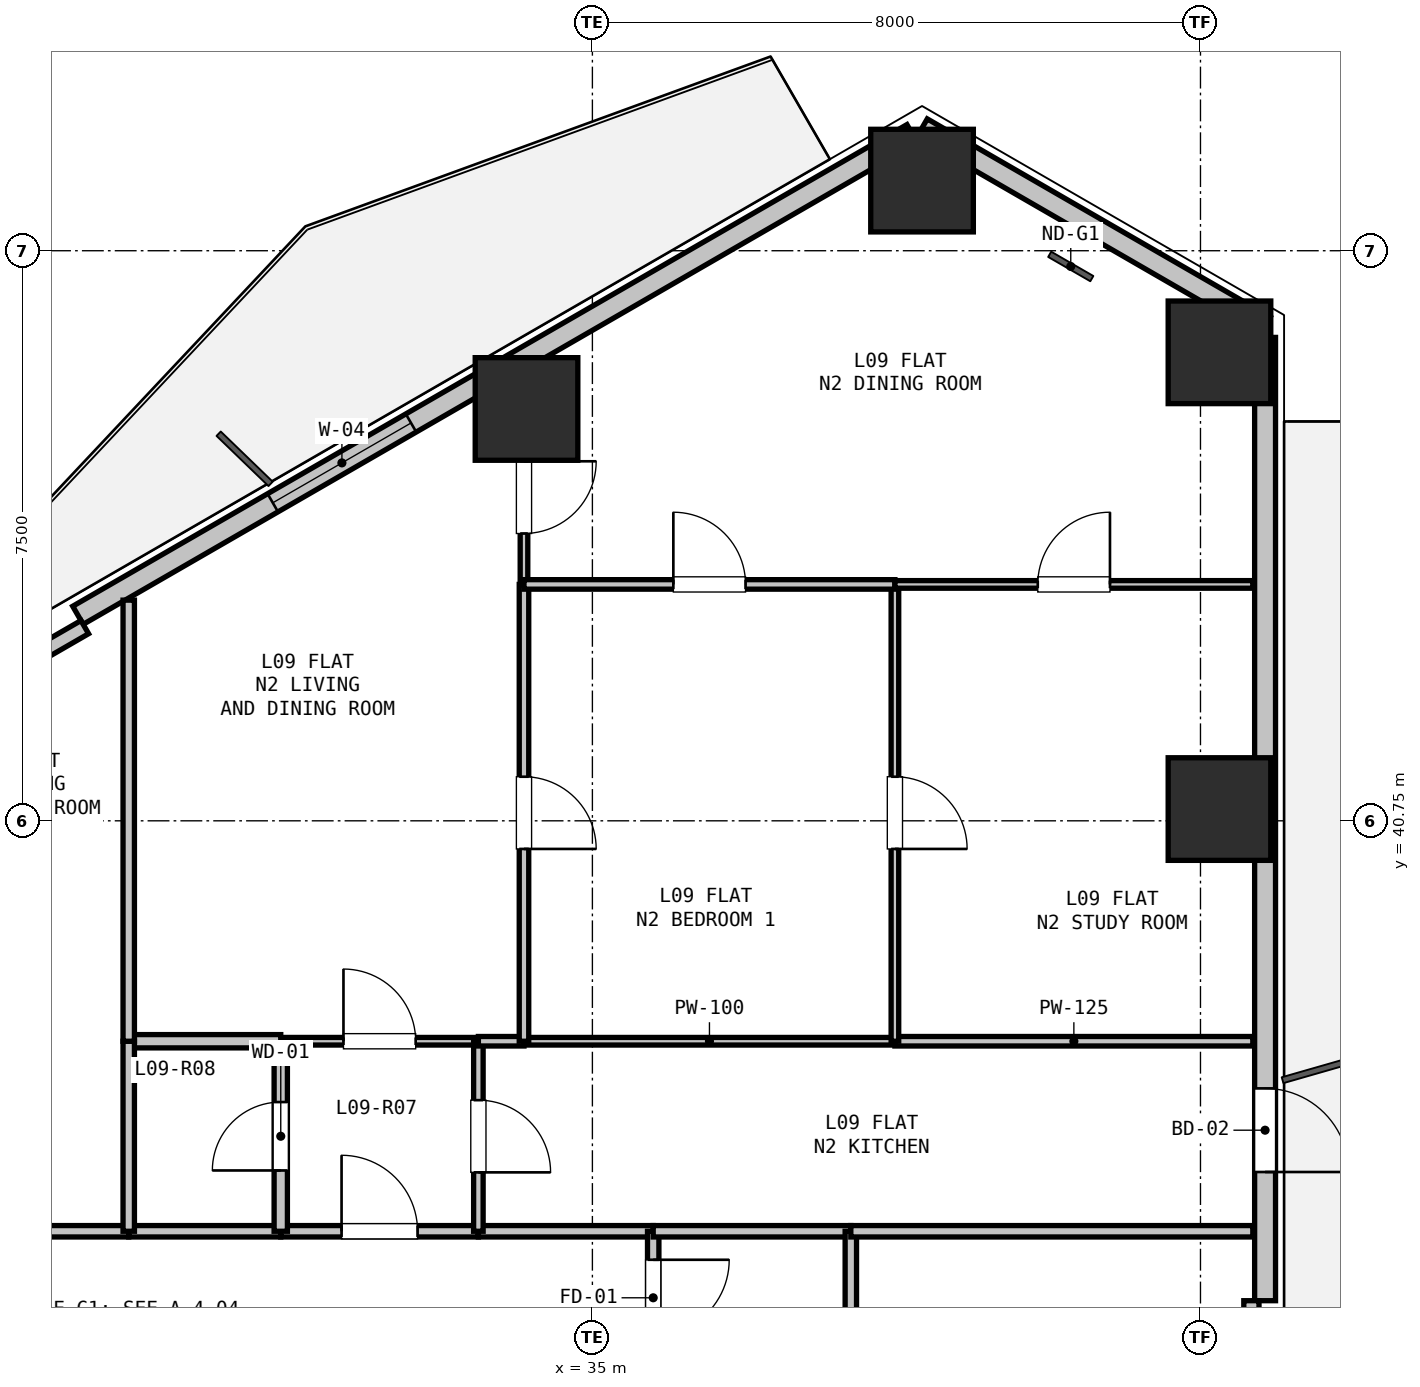
"""IFC4 building model, lengths in metres.
Left out: names, types, materials, properties, quantities, classifications, styles, units other than length and angle.
Written with IfcOpenShell. Run it as: python <this file> out.ifc"""

import sys

from ifc_helpers import new_model, si_unit, direction, frame, frame_2d, origin, origin_2d, place, context, subcontext, project, spatial, rectangle, hollow_rectangle, extrude, element, fill, save


model = new_model("IFC4")
c1 = context("Model", 3, precision=1e-05, world=origin(), true_north=direction((0.0, 1.0)))
c2 = subcontext(c1, "Body", "Model", "MODEL_VIEW")
j1 = project(units=[si_unit("LENGTHUNIT", "METRE"), si_unit("PLANEANGLEUNIT", "RADIAN")], contexts=[c1])
p1 = place(None, origin())
s1 = spatial("IfcSite", under=j1, at=p1, CompositionType="ELEMENT")
p2 = place(p1, origin())
s2 = spatial("IfcBuilding", under=s1, at=p2, CompositionType="ELEMENT")
p3 = place(p2, frame((0.0, 0.0, 35.7)))
s3 = spatial("IfcBuildingStorey", under=s2, at=p3, CompositionType="ELEMENT", Elevation=35.7)
for number, where, z_axis, x_axis in (
    (1, (34.133, 46.168, 0.0), (0.0, 0.0, 1.0), (1.0, 0.0, 0.0)),
    (2, (39.337, 49.173, 0.0), (0.0, 0.0, 1.0), (1.0, 0.0, 0.0)),
    (3, (43.25, 46.913, 0.0), (0.0, 0.0, 1.0), (1.0, 0.0, 0.0)),
    (4, (43.25, 40.905, 0.0), (0.0, 0.0, 1.0), (1.0, 0.0, 0.0)),
):
    element("IfcColumn", number, at=place(p3, frame(where, z_axis=z_axis, x_axis=x_axis)), inside=s3, PredefinedType="COLUMN", context=c2, shape_type="SweptSolid", body=[
        extrude(hollow_rectangle(XDim=1.35, YDim=1.35, WallThickness=0.036, at=origin_2d()), origin(), (0.0, 0.0, 1.0), 3.3),
    ])
p4 = place(p3, frame((39.337, 49.865, 0.0), z_axis=(0.0, 0.0, 1.0), x_axis=(0.866043601342, -0.499968479581, 0.0)))
e5 = element("IfcWall", 5, at=p4, inside=s3, PredefinedType="SOLIDWALL", context=c2, shape_type="SweptSolid", body=[
    extrude(rectangle(XDim=5.211, YDim=0.275, at=frame_2d((2.605, 0.0))), origin(), (0.0, 0.0, 1.0), 2.66),
])
p5 = place(p3, frame((28.232, 43.454, 0.0), z_axis=(0.0, 0.0, 1.0), x_axis=(0.86603192154, 0.499988710747, 0.0)))
e6 = element("IfcWall", 6, at=p5, inside=s3, PredefinedType="SOLIDWALL", context=c2, shape_type="SweptSolid", body=[
    extrude(rectangle(XDim=12.673, YDim=0.275, at=frame_2d((6.336, 0.0))), origin(), (0.0, 0.0, 1.0), 2.66),
])
p6 = place(p5, frame((2.96, 0.0, 0.9)))
e7 = element("IfcOpeningElement", 7, at=p6, cuts=e6, PredefinedType="OPENING", context=c2, shape_type="SweptSolid", body=[
    extrude(rectangle(XDim=2.1, YDim=1.6, at=frame_2d((1.05, 0.8))), frame((0.0, 0.147, 0.0), z_axis=(0.0, -1.0, 0.0), x_axis=(1.0, 0.0, 0.0)), (0.0, 0.0, 1.0), 0.295),
])
p7 = place(p3, frame((26.85, 42.448, 0.0), z_axis=(0.0, 0.0, 1.0), x_axis=(0.86605165483, 0.499954529098, 0.0)))
e8 = element("IfcWall", 8, at=p7, inside=s3, PredefinedType="PARAPET", context=c2, shape_type="SweptSolid", body=[
    extrude(rectangle(XDim=1.7, YDim=0.2, at=frame_2d((0.85, 0.0))), origin(), (0.0, 0.0, 1.0), 2.66),
])
p8 = place(p3, frame((43.85, 47.11, 0.0), z_axis=(0.0, 0.0, 1.0), x_axis=(0.0, -1.0, 0.0)))
e9 = element("IfcWall", 9, at=p8, inside=s3, PredefinedType="SOLIDWALL", context=c2, shape_type="SweptSolid", body=[
    extrude(rectangle(XDim=12.673, YDim=0.275, at=frame_2d((6.336, 0.0))), origin(), (0.0, 0.0, 1.0), 2.66),
])
p9 = place(p8, frame((9.88, 0.0, 0.0)))
e10 = element("IfcOpeningElement", 10, at=p9, cuts=e9, PredefinedType="OPENING", context=c2, shape_type="SweptSolid", body=[
    extrude(rectangle(XDim=1.1, YDim=2.1, at=frame_2d((0.55, 1.05))), frame((0.0, 0.147, 0.0), z_axis=(0.0, -1.0, 0.0), x_axis=(1.0, 0.0, 0.0)), (0.0, 0.0, 1.0), 0.295),
])
p10 = place(p3, frame((43.67, 34.437, 0.0), z_axis=(0.0, 0.0, 1.0), x_axis=(0.0, -1.0, 0.0)))
e11 = element("IfcWall", 11, at=p10, inside=s3, PredefinedType="PARAPET", context=c2, shape_type="SweptSolid", body=[
    extrude(rectangle(XDim=1.7, YDim=0.2, at=frame_2d((0.85, 0.0))), origin(), (0.0, 0.0, 1.0), 2.66),
])
p11 = place(p3, frame((27.3, 35.35, 0.0), z_axis=(0.0, 0.0, 1.0), x_axis=(1.0, 0.0, 0.0)))
e12 = element("IfcWall", 12, at=p11, inside=s3, PredefinedType="PARTITIONING", context=c2, shape_type="SweptSolid", body=[
    extrude(rectangle(XDim=1.6, YDim=0.15, at=frame_2d((0.8, 0.0))), origin(), (0.0, 0.0, 1.0), 3.04),
])
p12 = place(p3, frame((28.9, 35.35, 0.0), z_axis=(0.0, 0.0, 1.0), x_axis=(1.0, 0.0, 0.0)))
e13 = element("IfcWall", 13, at=p12, inside=s3, PredefinedType="PARTITIONING", context=c2, shape_type="SweptSolid", body=[
    extrude(rectangle(XDim=2.0, YDim=0.15, at=frame_2d((1.0, 0.0))), origin(), (0.0, 0.0, 1.0), 3.04),
])
p13 = place(p3, frame((30.9, 35.35, 0.0), z_axis=(0.0, 0.0, 1.0), x_axis=(1.0, 0.0, 0.0)))
e14 = element("IfcWall", 14, at=p13, inside=s3, PredefinedType="PARTITIONING", context=c2, shape_type="SweptSolid", body=[
    extrude(rectangle(XDim=2.6, YDim=0.15, at=frame_2d((1.3, 0.0))), origin(), (0.0, 0.0, 1.0), 3.04),
])
p14 = place(p13, frame((0.8, 0.0, 0.0)))
e15 = element("IfcOpeningElement", 15, at=p14, cuts=e14, PredefinedType="OPENING", context=c2, shape_type="SweptSolid", body=[
    extrude(rectangle(XDim=1.0, YDim=2.15, at=frame_2d((0.5, 1.075))), frame((0.0, 0.085, 0.0), z_axis=(0.0, -1.0, 0.0), x_axis=(1.0, 0.0, 0.0)), (0.0, 0.0, 1.0), 0.17),
])
p15 = place(p3, frame((33.5, 35.35, 0.0), z_axis=(0.0, 0.0, 1.0), x_axis=(1.0, 0.0, 0.0)))
e16 = element("IfcWall", 16, at=p15, inside=s3, PredefinedType="PARTITIONING", context=c2, shape_type="SweptSolid", body=[
    extrude(rectangle(XDim=2.3, YDim=0.15, at=frame_2d((1.15, 0.0))), origin(), (0.0, 0.0, 1.0), 3.04),
])
p16 = place(p3, frame((35.8, 35.35, 0.0), z_axis=(0.0, 0.0, 1.0), x_axis=(0.0, -1.0, 0.0)))
e17 = element("IfcWall", 17, at=p16, inside=s3, PredefinedType="PARTITIONING", context=c2, shape_type="SweptSolid", body=[
    extrude(rectangle(XDim=1.75, YDim=0.15, at=frame_2d((0.875, 0.0))), origin(), (0.0, 0.0, 1.0), 3.04),
])
p17 = place(p16, frame((0.375, 0.0, 0.0)))
e18 = element("IfcOpeningElement", 18, at=p17, cuts=e17, PredefinedType="OPENING", context=c2, shape_type="SweptSolid", body=[
    extrude(rectangle(XDim=1.0, YDim=2.15, at=frame_2d((0.5, 1.075))), frame((0.0, 0.085, 0.0), z_axis=(0.0, -1.0, 0.0), x_axis=(1.0, 0.0, 0.0)), (0.0, 0.0, 1.0), 0.17),
])
p18 = place(p3, frame((35.8, 35.35, 0.0), z_axis=(0.0, 0.0, 1.0), x_axis=(1.0, 0.0, 0.0)))
e19 = element("IfcWall", 19, at=p18, inside=s3, PredefinedType="PARTITIONING", context=c2, shape_type="SweptSolid", body=[
    extrude(rectangle(XDim=2.6, YDim=0.15, at=frame_2d((1.3, 0.0))), origin(), (0.0, 0.0, 1.0), 2.338),
])
p19 = place(p3, frame((38.4, 35.35, 0.0), z_axis=(0.0, 0.0, 1.0), x_axis=(0.0, -1.0, 0.0)))
e20 = element("IfcWall", 20, at=p19, inside=s3, PredefinedType="PARTITIONING", context=c2, shape_type="SweptSolid", body=[
    extrude(rectangle(XDim=5.35, YDim=0.15, at=frame_2d((2.675, 0.0))), origin(), (0.0, 0.0, 1.0), 2.338),
])
p20 = place(p3, frame((30.9, 37.85, 0.0), z_axis=(0.0, 0.0, 1.0), x_axis=(1.0, 0.0, 0.0)))
e21 = element("IfcWall", 21, at=p20, inside=s3, PredefinedType="PARTITIONING", context=c2, shape_type="SweptSolid", body=[
    extrude(rectangle(XDim=2.6, YDim=0.1, at=frame_2d((1.3, 0.0))), origin(), (0.0, 0.0, 1.0), 3.04),
])
p21 = place(p20, frame((0.825, 0.0, 0.0)))
e22 = element("IfcOpeningElement", 22, at=p21, cuts=e21, PredefinedType="OPENING", context=c2, shape_type="SweptSolid", body=[
    extrude(rectangle(XDim=0.95, YDim=2.1, at=frame_2d((0.475, 1.05))), frame((0.0, 0.06, 0.0), z_axis=(0.0, -1.0, 0.0), x_axis=(1.0, 0.0, 0.0)), (0.0, 0.0, 1.0), 0.12),
])
p22 = place(p3, frame((33.5, 37.85, 0.0), z_axis=(0.0, 0.0, 1.0), x_axis=(0.0, -1.0, 0.0)))
e23 = element("IfcWall", 23, at=p22, inside=s3, PredefinedType="PARTITIONING", context=c2, shape_type="SweptSolid", body=[
    extrude(rectangle(XDim=2.5, YDim=0.125, at=frame_2d((1.25, 0.0))), origin(), (0.0, 0.0, 1.0), 3.04),
])
p23 = place(p22, frame((0.775, 0.0, 0.0)))
e24 = element("IfcOpeningElement", 24, at=p23, cuts=e23, PredefinedType="OPENING", context=c2, shape_type="SweptSolid", body=[
    extrude(rectangle(XDim=0.95, YDim=2.1, at=frame_2d((0.475, 1.05))), frame((0.0, 0.073, 0.0), z_axis=(0.0, -1.0, 0.0), x_axis=(1.0, 0.0, 0.0)), (0.0, 0.0, 1.0), 0.145),
])
p24 = place(p3, frame((30.9, 35.35, 0.0), z_axis=(0.0, 0.0, 1.0), x_axis=(0.0, 1.0, 0.0)))
e25 = element("IfcWall", 25, at=p24, inside=s3, PredefinedType="PLUMBINGWALL", context=c2, shape_type="SweptSolid", body=[
    extrude(rectangle(XDim=2.5, YDim=0.175, at=frame_2d((1.25, 0.0))), origin(), (0.0, 0.0, 1.0), 3.04),
])
p25 = place(p24, frame((0.8, 0.0, 0.0)))
e26 = element("IfcOpeningElement", 26, at=p25, cuts=e25, PredefinedType="OPENING", context=c2, shape_type="SweptSolid", body=[
    extrude(rectangle(XDim=0.9, YDim=2.1, at=frame_2d((0.45, 1.05))), frame((0.0, 0.097, 0.0), z_axis=(0.0, -1.0, 0.0), x_axis=(1.0, 0.0, 0.0)), (0.0, 0.0, 1.0), 0.195),
])
p26 = place(p3, frame((28.9, 37.85, 0.0), z_axis=(0.0, 0.0, 1.0), x_axis=(1.0, 0.0, 0.0)))
e27 = element("IfcWall", 27, at=p26, inside=s3, PredefinedType="PLUMBINGWALL", context=c2, shape_type="SweptSolid", body=[
    extrude(rectangle(XDim=2.0, YDim=0.175, at=frame_2d((1.0, 0.0))), origin(), (0.0, 0.0, 1.0), 3.04),
])
p27 = place(p3, frame((28.9, 35.35, 0.0), z_axis=(0.0, 0.0, 1.0), x_axis=(0.0, 1.0, 0.0)))
e28 = element("IfcWall", 28, at=p27, inside=s3, PredefinedType="PARTITIONING", context=c2, shape_type="SweptSolid", body=[
    extrude(rectangle(XDim=2.5, YDim=0.15, at=frame_2d((1.25, 0.0))), origin(), (0.0, 0.0, 1.0), 3.04),
])
p28 = place(p3, frame((43.688, 35.35, 0.0), z_axis=(0.0, 0.0, 1.0), x_axis=(-1.0, 0.0, 0.0)))
e29 = element("IfcWall", 29, at=p28, inside=s3, PredefinedType="PARTITIONING", context=c2, shape_type="SweptSolid", body=[
    extrude(rectangle(XDim=5.289, YDim=0.15, at=frame_2d((2.644, 0.0))), origin(), (0.0, 0.0, 1.0), 2.338),
])
p29 = place(p3, frame((33.5, 37.85, 0.0), z_axis=(0.0, 0.0, 1.0), x_axis=(1.0, 0.0, 0.0)))
e30 = element("IfcWall", 30, at=p29, inside=s3, PredefinedType="PARTITIONING", context=c2, shape_type="SweptSolid", body=[
    extrude(rectangle(XDim=0.6, YDim=0.125, at=frame_2d((0.3, 0.0))), origin(), (0.0, 0.0, 1.0), 3.04),
])
p30 = place(p3, frame((34.1, 37.85, 0.0), z_axis=(0.0, 0.0, 1.0), x_axis=(1.0, 0.0, 0.0)))
e31 = element("IfcWall", 31, at=p30, inside=s3, PredefinedType="PARTITIONING", context=c2, shape_type="SweptSolid", body=[
    extrude(rectangle(XDim=4.88, YDim=0.1, at=frame_2d((2.44, 0.0))), origin(), (0.0, 0.0, 1.0), 2.338),
])
p31 = place(p3, frame((38.98, 37.85, 0.0), z_axis=(0.0, 0.0, 1.0), x_axis=(1.0, 0.0, 0.0)))
e32 = element("IfcWall", 32, at=p31, inside=s3, PredefinedType="PARTITIONING", context=c2, shape_type="SweptSolid", body=[
    extrude(rectangle(XDim=4.708, YDim=0.125, at=frame_2d((2.354, 0.0))), origin(), (0.0, 0.0, 1.0), 2.338),
])
p32 = place(p3, frame((28.9, 43.653, 0.0), z_axis=(0.0, 0.0, 1.0), x_axis=(0.0, -1.0, 0.0)))
e33 = element("IfcWall", 33, at=p32, inside=s3, PredefinedType="PARTITIONING", context=c2, shape_type="SweptSolid", body=[
    extrude(rectangle(XDim=5.803, YDim=0.15, at=frame_2d((2.901, 0.0))), origin(), (0.0, 0.0, 1.0), 2.365),
])
p33 = place(p3, frame((34.1, 46.655, 0.0), z_axis=(0.0, 0.0, 1.0), x_axis=(0.0, -1.0, 0.0)))
e34 = element("IfcWall", 34, at=p33, inside=s3, PredefinedType="PARTITIONING", context=c2, shape_type="SweptSolid", body=[
    extrude(rectangle(XDim=2.795, YDim=0.1, at=frame_2d((1.397, 0.0))), origin(), (0.0, 0.0, 1.0), 3.04),
])
p34 = place(p33, frame((1.175, 0.0, 0.0)))
e35 = element("IfcOpeningElement", 35, at=p34, cuts=e34, PredefinedType="OPENING", context=c2, shape_type="SweptSolid", body=[
    extrude(rectangle(XDim=0.95, YDim=2.1, at=frame_2d((0.475, 1.05))), frame((0.0, 0.06, 0.0), z_axis=(0.0, -1.0, 0.0), x_axis=(1.0, 0.0, 0.0)), (0.0, 0.0, 1.0), 0.12),
])
p35 = place(p3, frame((34.1, 43.86, 0.0), z_axis=(0.0, 0.0, 1.0), x_axis=(0.0, -1.0, 0.0)))
e36 = element("IfcWall", 36, at=p35, inside=s3, PredefinedType="PARTITIONING", context=c2, shape_type="SweptSolid", body=[
    extrude(rectangle(XDim=6.01, YDim=0.125, at=frame_2d((3.005, 0.0))), origin(), (0.0, 0.0, 1.0), 3.04),
])
p36 = place(p35, frame((2.53, 0.0, 0.0)))
e37 = element("IfcOpeningElement", 37, at=p36, cuts=e36, PredefinedType="OPENING", context=c2, shape_type="SweptSolid", body=[
    extrude(rectangle(XDim=0.95, YDim=2.1, at=frame_2d((0.475, 1.05))), frame((0.0, 0.073, 0.0), z_axis=(0.0, -1.0, 0.0), x_axis=(1.0, 0.0, 0.0)), (0.0, 0.0, 1.0), 0.145),
])
p37 = place(p3, frame((38.98, 43.86, 0.0), z_axis=(0.0, 0.0, 1.0), x_axis=(0.0, -1.0, 0.0)))
e38 = element("IfcWall", 38, at=p37, inside=s3, PredefinedType="PARTITIONING", context=c2, shape_type="SweptSolid", body=[
    extrude(rectangle(XDim=6.01, YDim=0.1, at=frame_2d((3.005, 0.0))), origin(), (0.0, 0.0, 1.0), 3.04),
])
p38 = place(p37, frame((2.53, 0.0, 0.0)))
e39 = element("IfcOpeningElement", 39, at=p38, cuts=e38, PredefinedType="OPENING", context=c2, shape_type="SweptSolid", body=[
    extrude(rectangle(XDim=0.95, YDim=2.1, at=frame_2d((0.475, 1.05))), frame((0.0, 0.06, 0.0), z_axis=(0.0, -1.0, 0.0), x_axis=(1.0, 0.0, 0.0)), (0.0, 0.0, 1.0), 0.12),
])
p39 = place(p3, frame((34.1, 43.86, 0.0), z_axis=(0.0, 0.0, 1.0), x_axis=(1.0, 0.0, 0.0)))
e40 = element("IfcWall", 40, at=p39, inside=s3, PredefinedType="PARTITIONING", context=c2, shape_type="SweptSolid", body=[
    extrude(rectangle(XDim=4.88, YDim=0.125, at=frame_2d((2.44, 0.0))), origin(), (0.0, 0.0, 1.0), 2.338),
])
p40 = place(p39, frame((1.965, 0.0, 0.0)))
e41 = element("IfcOpeningElement", 41, at=p40, cuts=e40, PredefinedType="OPENING", context=c2, shape_type="SweptSolid", body=[
    extrude(rectangle(XDim=0.95, YDim=2.1, at=frame_2d((0.475, 1.05))), frame((0.0, 0.073, 0.0), z_axis=(0.0, -1.0, 0.0), x_axis=(1.0, 0.0, 0.0)), (0.0, 0.0, 1.0), 0.145),
])
p41 = place(p3, frame((38.98, 43.86, 0.0), z_axis=(0.0, 0.0, 1.0), x_axis=(1.0, 0.0, 0.0)))
e42 = element("IfcWall", 42, at=p41, inside=s3, PredefinedType="PARTITIONING", context=c2, shape_type="SweptSolid", body=[
    extrude(rectangle(XDim=4.708, YDim=0.1, at=frame_2d((2.354, 0.0))), origin(), (0.0, 0.0, 1.0), 2.65),
])
p42 = place(p41, frame((1.879, 0.0, 0.0)))
e43 = element("IfcOpeningElement", 43, at=p42, cuts=e42, PredefinedType="OPENING", context=c2, shape_type="SweptSolid", body=[
    extrude(rectangle(XDim=0.95, YDim=2.1, at=frame_2d((0.475, 1.05))), frame((0.0, 0.06, 0.0), z_axis=(0.0, -1.0, 0.0), x_axis=(1.0, 0.0, 0.0)), (0.0, 0.0, 1.0), 0.12),
])
p43 = place(p6, origin())
e44 = element("IfcWindow", 44, at=p43, inside=s3, PartitioningType="SINGLE_PANEL", PredefinedType="WINDOW", context=c2, shape_type="SweptSolid", body=[
    extrude(rectangle(XDim=2.1, YDim=1.6, at=frame_2d((1.05, 0.8))), frame((0.0, 0.03, 0.0), z_axis=(0.0, -1.0, 0.0), x_axis=(1.0, 0.0, 0.0)), (0.0, 0.0, 1.0), 0.06),
])
fill(e7, e44)
p44 = place(p9, origin())
e45 = element("IfcDoor", 45, at=p44, inside=s3, OperationType="SINGLE_SWING_RIGHT", PredefinedType="DOOR", context=c2, shape_type="SweptSolid", body=[
    extrude(rectangle(XDim=1.1, YDim=2.1, at=frame_2d((0.55, 1.05))), frame((0.0, 0.025, 0.0), z_axis=(0.0, -1.0, 0.0), x_axis=(1.0, 0.0, 0.0)), (0.0, 0.0, 1.0), 0.05),
])
fill(e10, e45)
p45 = place(p17, origin())
e46 = element("IfcDoor", 46, at=p45, inside=s3, OperationType="SINGLE_SWING_LEFT", PredefinedType="DOOR", context=c2, shape_type="SweptSolid", body=[
    extrude(rectangle(XDim=1.0, YDim=2.15, at=frame_2d((0.5, 1.075))), frame((0.0, 0.025, 0.0), z_axis=(0.0, -1.0, 0.0), x_axis=(1.0, 0.0, 0.0)), (0.0, 0.0, 1.0), 0.05),
])
fill(e18, e46)
p46 = place(p14, origin())
e47 = element("IfcDoor", 47, at=p46, inside=s3, OperationType="SINGLE_SWING_LEFT", PredefinedType="DOOR", context=c2, shape_type="SweptSolid", body=[
    extrude(rectangle(XDim=1.0, YDim=2.15, at=frame_2d((0.5, 1.075))), frame((0.0, 0.025, 0.0), z_axis=(0.0, -1.0, 0.0), x_axis=(1.0, 0.0, 0.0)), (0.0, 0.0, 1.0), 0.05),
])
fill(e15, e47)
p47 = place(p25, origin())
e48 = element("IfcDoor", 48, at=p47, inside=s3, OperationType="SINGLE_SWING_LEFT", PredefinedType="DOOR", context=c2, shape_type="SweptSolid", body=[
    extrude(rectangle(XDim=0.9, YDim=2.1, at=frame_2d((0.45, 1.05))), frame((0.0, 0.025, 0.0), z_axis=(0.0, -1.0, 0.0), x_axis=(1.0, 0.0, 0.0)), (0.0, 0.0, 1.0), 0.05),
])
fill(e26, e48)
p48 = place(p23, origin())
e49 = element("IfcDoor", 49, at=p48, inside=s3, OperationType="SINGLE_SWING_RIGHT", PredefinedType="DOOR", context=c2, shape_type="SweptSolid", body=[
    extrude(rectangle(XDim=0.95, YDim=2.1, at=frame_2d((0.475, 1.05))), frame((0.0, 0.025, 0.0), z_axis=(0.0, -1.0, 0.0), x_axis=(1.0, 0.0, 0.0)), (0.0, 0.0, 1.0), 0.05),
])
fill(e24, e49)
p49 = place(p21, origin())
e50 = element("IfcDoor", 50, at=p49, inside=s3, OperationType="SINGLE_SWING_LEFT", PredefinedType="DOOR", context=c2, shape_type="SweptSolid", body=[
    extrude(rectangle(XDim=0.95, YDim=2.1, at=frame_2d((0.475, 1.05))), frame((0.0, 0.025, 0.0), z_axis=(0.0, -1.0, 0.0), x_axis=(1.0, 0.0, 0.0)), (0.0, 0.0, 1.0), 0.05),
])
fill(e22, e50)
p50 = place(p36, origin())
e51 = element("IfcDoor", 51, at=p50, inside=s3, OperationType="SINGLE_SWING_RIGHT", PredefinedType="DOOR", context=c2, shape_type="SweptSolid", body=[
    extrude(rectangle(XDim=0.95, YDim=2.1, at=frame_2d((0.475, 1.05))), frame((0.0, 0.025, 0.0), z_axis=(0.0, -1.0, 0.0), x_axis=(1.0, 0.0, 0.0)), (0.0, 0.0, 1.0), 0.05),
])
fill(e37, e51)
p51 = place(p34, origin())
e52 = element("IfcDoor", 52, at=p51, inside=s3, OperationType="SINGLE_SWING_LEFT", PredefinedType="DOOR", context=c2, shape_type="SweptSolid", body=[
    extrude(rectangle(XDim=0.95, YDim=2.1, at=frame_2d((0.475, 1.05))), frame((0.0, 0.025, 0.0), z_axis=(0.0, -1.0, 0.0), x_axis=(1.0, 0.0, 0.0)), (0.0, 0.0, 1.0), 0.05),
])
fill(e35, e52)
p52 = place(p38, origin())
e53 = element("IfcDoor", 53, at=p52, inside=s3, OperationType="SINGLE_SWING_RIGHT", PredefinedType="DOOR", context=c2, shape_type="SweptSolid", body=[
    extrude(rectangle(XDim=0.95, YDim=2.1, at=frame_2d((0.475, 1.05))), frame((0.0, 0.025, 0.0), z_axis=(0.0, -1.0, 0.0), x_axis=(1.0, 0.0, 0.0)), (0.0, 0.0, 1.0), 0.05),
])
fill(e39, e53)
p53 = place(p40, origin())
e54 = element("IfcDoor", 54, at=p53, inside=s3, OperationType="SINGLE_SWING_LEFT", PredefinedType="DOOR", context=c2, shape_type="SweptSolid", body=[
    extrude(rectangle(XDim=0.95, YDim=2.1, at=frame_2d((0.475, 1.05))), frame((0.0, 0.025, 0.0), z_axis=(0.0, -1.0, 0.0), x_axis=(1.0, 0.0, 0.0)), (0.0, 0.0, 1.0), 0.05),
])
fill(e41, e54)
p54 = place(p42, origin())
e55 = element("IfcDoor", 55, at=p54, inside=s3, OperationType="SINGLE_SWING_RIGHT", PredefinedType="DOOR", context=c2, shape_type="SweptSolid", body=[
    extrude(rectangle(XDim=0.95, YDim=2.1, at=frame_2d((0.475, 1.05))), frame((0.0, 0.025, 0.0), z_axis=(0.0, -1.0, 0.0), x_axis=(1.0, 0.0, 0.0)), (0.0, 0.0, 1.0), 0.05),
])
fill(e43, e55)
save(model, sys.argv[1])
